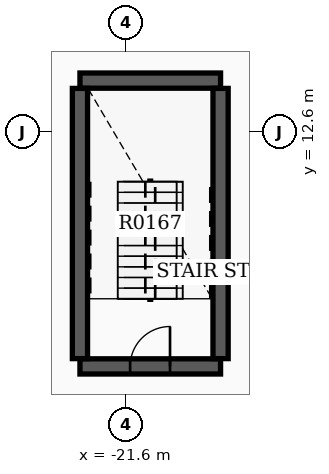
"""IFC4 building model, lengths in metres.
Left out: names, types, materials, properties, quantities, classifications, styles, units other than length and angle.
Written with IfcOpenShell. Run it as: python <this file> out.ifc"""

import sys

from ifc_helpers import new_model, si_unit, direction, frame, frame_2d, origin, place, context, subcontext, project, spatial, rectangle, extrude, element, fill, save


model = new_model("IFC4")
c1 = context("Model", 3, precision=1e-05, world=origin(), true_north=direction((0.0, 1.0)))
c2 = subcontext(c1, "Body", "Model", "MODEL_VIEW")
j1 = project(units=[si_unit("LENGTHUNIT", "METRE"), si_unit("PLANEANGLEUNIT", "RADIAN")], contexts=[c1])
p1 = place(None, origin())
s1 = spatial("IfcSite", under=j1, at=p1, CompositionType="ELEMENT")
p2 = place(p1, origin())
s2 = spatial("IfcBuilding", under=s1, at=p2, CompositionType="ELEMENT")
p3 = place(p2, frame((0.0, 0.0, 10.2)))
s3 = spatial("IfcBuildingStorey", under=s2, at=p3, CompositionType="ELEMENT", Elevation=10.2)
p4 = place(p3, frame((-22.82, 13.95, 0.0), z_axis=(0.0, 0.0, 1.0), x_axis=(1.0, 0.0, 0.0)))
e1 = element("IfcWall", 1, at=p4, inside=s3, PredefinedType="SHEAR", context=c2, shape_type="SweptSolid", body=[
    extrude(rectangle(XDim=3.7, YDim=0.4, at=frame_2d((1.85, 0.0))), origin(), (0.0, 0.0, 1.0), 4.25),
])
p5 = place(p3, frame((-22.82, 6.43, 0.0), z_axis=(0.0, 0.0, 1.0), x_axis=(1.0, 0.0, 0.0)))
e2 = element("IfcWall", 2, at=p5, inside=s3, PredefinedType="SHEAR", context=c2, shape_type="SweptSolid", body=[
    extrude(rectangle(XDim=3.7, YDim=0.4, at=frame_2d((1.85, 0.0))), origin(), (0.0, 0.0, 1.0), 4.25),
])
p6 = place(p5, frame((1.32, 0.0, 0.0)))
e3 = element("IfcOpeningElement", 3, at=p6, cuts=e2, PredefinedType="OPENING", context=c2, shape_type="SweptSolid", body=[
    extrude(rectangle(XDim=1.05, YDim=2.15, at=frame_2d((0.525, 1.075))), frame((0.0, 0.21, 0.0), z_axis=(0.0, -1.0, 0.0), x_axis=(1.0, 0.0, 0.0)), (0.0, 0.0, 1.0), 0.42),
])
for number, where, z_axis, x_axis in (
    (4, (-22.82, 6.635, 0.0), (0.0, 0.0, 1.0), (0.0, 1.0, 0.0)),
    (5, (-19.12, 6.635, 0.0), (0.0, 0.0, 1.0), (0.0, 1.0, 0.0)),
):
    element("IfcWall", number, at=place(p3, frame(where, z_axis=z_axis, x_axis=x_axis)), inside=s3, PredefinedType="SHEAR", context=c2, shape_type="SweptSolid", body=[
        extrude(rectangle(XDim=7.11, YDim=0.4, at=frame_2d((3.555, 0.0))), origin(), (0.0, 0.0, 1.0), 4.25),
    ])
p7 = place(p6, origin())
e6 = element("IfcDoor", 6, at=p7, inside=s3, OperationType="SINGLE_SWING_RIGHT", PredefinedType="DOOR", context=c2, shape_type="SweptSolid", body=[
    extrude(rectangle(XDim=1.05, YDim=2.15, at=frame_2d((0.525, 1.075))), frame((0.0, 0.025, 0.0), z_axis=(0.0, -1.0, 0.0), x_axis=(1.0, 0.0, 0.0)), (0.0, 0.0, 1.0), 0.05),
])
fill(e3, e6)
save(model, sys.argv[1])
